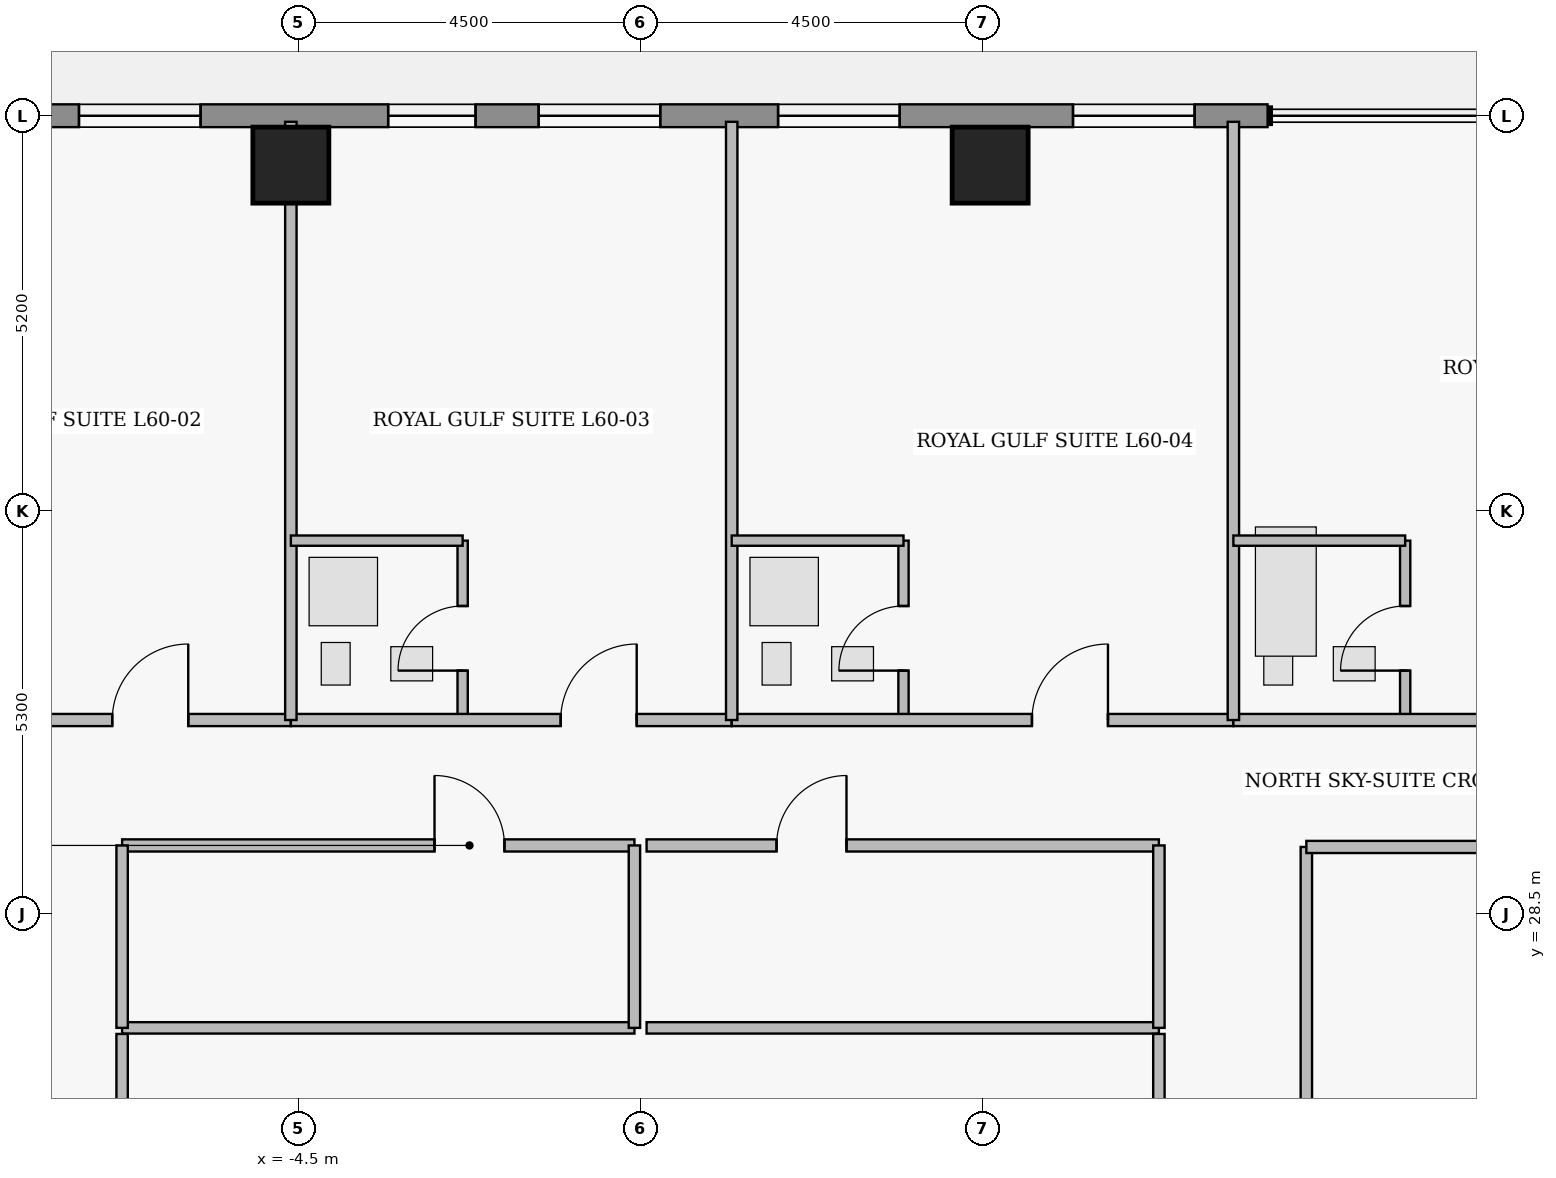
"""IFC4 building model, lengths in metres.
Left out: names, types, materials, properties, quantities, classifications, styles, units other than length and angle.
Written with IfcOpenShell. Run it as: python <this file> out.ifc"""

import sys

from ifc_helpers import new_model, si_unit, direction, frame, frame_2d, origin, origin_2d, place, context, subcontext, project, spatial, rectangle, extrude, element, fill, save


model = new_model("IFC4")
c1 = context("Model", 3, precision=1e-05, world=origin(), true_north=direction((0.0, 1.0)))
c2 = subcontext(c1, "Body", "Model", "MODEL_VIEW")
j1 = project(units=[si_unit("LENGTHUNIT", "METRE"), si_unit("PLANEANGLEUNIT", "RADIAN")], contexts=[c1])
p1 = place(None, origin())
s1 = spatial("IfcSite", under=j1, at=p1, CompositionType="ELEMENT")
p2 = place(p1, origin())
s2 = spatial("IfcBuilding", under=s1, at=p2, CompositionType="ELEMENT")
p3 = place(p2, frame((0.0, 0.0, 239.65)))
s3 = spatial("IfcBuildingStorey", under=s2, at=p3, CompositionType="ELEMENT", Elevation=239.65)
for number, where, z_axis, x_axis in (
    (1, (-4.6, 38.35, 0.43), (0.0, 0.0, 1.0), (1.0, 0.0, 0.0)),
    (2, (4.6, 38.35, 0.43), (0.0, 0.0, 1.0), (1.0, 0.0, 0.0)),
):
    element("IfcColumn", number, at=place(p3, frame(where, z_axis=z_axis, x_axis=x_axis)), inside=s3, PredefinedType="COLUMN", context=c2, shape_type="SweptSolid", body=[
        extrude(rectangle(XDim=1.0, YDim=1.0, at=origin_2d()), origin(), (0.0, 0.0, 1.0), 3.27),
    ])
p4 = place(p3, frame((-16.8, 39.0, 0.0), z_axis=(0.0, 0.0, 1.0), x_axis=(1.0, 0.0, 0.0)))
e3 = element("IfcWall", 3, at=p4, inside=s3, PredefinedType="STANDARD", context=c2, shape_type="SweptSolid", body=[
    extrude(rectangle(XDim=25.05, YDim=0.3, at=frame_2d((12.525, 0.0))), origin(), (0.0, 0.0, 1.0), 3.48),
])
p5 = place(p4, frame((7.325, 0.0, 0.0)))
e4 = element("IfcOpeningElement", 4, at=p5, cuts=e3, PredefinedType="OPENING", context=c2, shape_type="SweptSolid", body=[
    extrude(rectangle(XDim=1.35, YDim=2.3, at=frame_2d((0.675, 1.15))), frame((0.0, 0.16, 0.0), z_axis=(0.0, -1.0, 0.0), x_axis=(1.0, 0.0, 0.0)), (0.0, 0.0, 1.0), 0.32),
])
p6 = place(p4, frame((15.46, 0.0, 0.85)))
e5 = element("IfcOpeningElement", 5, at=p6, cuts=e3, PredefinedType="OPENING", context=c2, shape_type="SweptSolid", body=[
    extrude(rectangle(XDim=1.6, YDim=1.8, at=frame_2d((0.8, 0.9))), frame((0.0, 0.16, 0.0), z_axis=(0.0, -1.0, 0.0), x_axis=(1.0, 0.0, 0.0)), (0.0, 0.0, 1.0), 0.32),
])
p7 = place(p4, frame((0.695, 0.0, 0.95)))
e6 = element("IfcOpeningElement", 6, at=p7, cuts=e3, PredefinedType="OPENING", context=c2, shape_type="SweptSolid", body=[
    extrude(rectangle(XDim=1.15, YDim=1.55, at=frame_2d((0.575, 0.775))), frame((0.0, 0.16, 0.0), z_axis=(0.0, -1.0, 0.0), x_axis=(1.0, 0.0, 0.0)), (0.0, 0.0, 1.0), 0.32),
])
p8 = place(p4, frame((4.09, 0.0, 0.85)))
e7 = element("IfcOpeningElement", 7, at=p8, cuts=e3, PredefinedType="OPENING", context=c2, shape_type="SweptSolid", body=[
    extrude(rectangle(XDim=1.6, YDim=1.8, at=frame_2d((0.8, 0.9))), frame((0.0, 0.16, 0.0), z_axis=(0.0, -1.0, 0.0), x_axis=(1.0, 0.0, 0.0)), (0.0, 0.0, 1.0), 0.32),
])
p9 = place(p4, frame((9.413, 0.0, 0.85)))
e8 = element("IfcOpeningElement", 8, at=p9, cuts=e3, PredefinedType="OPENING", context=c2, shape_type="SweptSolid", body=[
    extrude(rectangle(XDim=1.6, YDim=1.8, at=frame_2d((0.8, 0.9))), frame((0.0, 0.16, 0.0), z_axis=(0.0, -1.0, 0.0), x_axis=(1.0, 0.0, 0.0)), (0.0, 0.0, 1.0), 0.32),
])
p10 = place(p4, frame((13.48, 0.0, 0.95)))
e9 = element("IfcOpeningElement", 9, at=p10, cuts=e3, PredefinedType="OPENING", context=c2, shape_type="SweptSolid", body=[
    extrude(rectangle(XDim=1.15, YDim=1.55, at=frame_2d((0.575, 0.775))), frame((0.0, 0.16, 0.0), z_axis=(0.0, -1.0, 0.0), x_axis=(1.0, 0.0, 0.0)), (0.0, 0.0, 1.0), 0.32),
])
p11 = place(p4, frame((18.61, 0.0, 0.85)))
e10 = element("IfcOpeningElement", 10, at=p11, cuts=e3, PredefinedType="OPENING", context=c2, shape_type="SweptSolid", body=[
    extrude(rectangle(XDim=1.6, YDim=1.8, at=frame_2d((0.8, 0.9))), frame((0.0, 0.16, 0.0), z_axis=(0.0, -1.0, 0.0), x_axis=(1.0, 0.0, 0.0)), (0.0, 0.0, 1.0), 0.32),
])
p12 = place(p4, frame((22.49, 0.0, 0.85)))
e11 = element("IfcOpeningElement", 11, at=p12, cuts=e3, PredefinedType="OPENING", context=c2, shape_type="SweptSolid", body=[
    extrude(rectangle(XDim=1.6, YDim=1.8, at=frame_2d((0.8, 0.9))), frame((0.0, 0.16, 0.0), z_axis=(0.0, -1.0, 0.0), x_axis=(1.0, 0.0, 0.0)), (0.0, 0.0, 1.0), 0.32),
])
p13 = place(p3, frame((-10.6, 31.05, 0.0), z_axis=(0.0, 0.0, 1.0), x_axis=(1.0, 0.0, 0.0)))
e12 = element("IfcWall", 12, at=p13, inside=s3, PredefinedType="PARTITIONING", context=c2, shape_type="SweptSolid", body=[
    extrude(rectangle(XDim=6.0, YDim=0.16, at=frame_2d((3.0, 0.0))), origin(), (0.0, 0.0, 1.0), 3.48),
])
p14 = place(p13, frame((3.65, 0.0, 0.0)))
e13 = element("IfcOpeningElement", 13, at=p14, cuts=e12, PredefinedType="OPENING", context=c2, shape_type="SweptSolid", body=[
    extrude(rectangle(XDim=1.0, YDim=2.15, at=frame_2d((0.5, 1.075))), frame((0.0, 0.09, 0.0), z_axis=(0.0, -1.0, 0.0), x_axis=(1.0, 0.0, 0.0)), (0.0, 0.0, 1.0), 0.18),
])
p15 = place(p3, frame((-2.34, 31.05, 0.0), z_axis=(0.0, 0.0, 1.0), x_axis=(0.0, 1.0, 0.0)))
e14 = element("IfcWall", 14, at=p15, inside=s3, PredefinedType="PLUMBINGWALL", context=c2, shape_type="SweptSolid", body=[
    extrude(rectangle(XDim=2.36, YDim=0.135, at=frame_2d((1.18, 0.0))), origin(), (0.0, 0.0, 1.0), 3.48),
])
p16 = place(p15, frame((0.65, 0.0, 0.0)))
e15 = element("IfcOpeningElement", 15, at=p16, cuts=e14, PredefinedType="OPENING", context=c2, shape_type="SweptSolid", body=[
    extrude(rectangle(XDim=0.85, YDim=2.1, at=frame_2d((0.425, 1.05))), frame((0.0, 0.077, 0.0), z_axis=(0.0, -1.0, 0.0), x_axis=(1.0, 0.0, 0.0)), (0.0, 0.0, 1.0), 0.155),
])
p17 = place(p3, frame((-4.6, 31.05, 0.0), z_axis=(0.0, 0.0, 1.0), x_axis=(1.0, 0.0, 0.0)))
e16 = element("IfcWall", 16, at=p17, inside=s3, PredefinedType="PARTITIONING", context=c2, shape_type="SweptSolid", body=[
    extrude(rectangle(XDim=5.8, YDim=0.16, at=frame_2d((2.9, 0.0))), origin(), (0.0, 0.0, 1.0), 3.48),
])
p18 = place(p17, frame((3.55, 0.0, 0.0)))
e17 = element("IfcOpeningElement", 17, at=p18, cuts=e16, PredefinedType="OPENING", context=c2, shape_type="SweptSolid", body=[
    extrude(rectangle(XDim=1.0, YDim=2.15, at=frame_2d((0.5, 1.075))), frame((0.0, 0.09, 0.0), z_axis=(0.0, -1.0, 0.0), x_axis=(1.0, 0.0, 0.0)), (0.0, 0.0, 1.0), 0.18),
])
p19 = place(p3, frame((3.46, 31.05, 0.0), z_axis=(0.0, 0.0, 1.0), x_axis=(0.0, 1.0, 0.0)))
e18 = element("IfcWall", 18, at=p19, inside=s3, PredefinedType="PLUMBINGWALL", context=c2, shape_type="SweptSolid", body=[
    extrude(rectangle(XDim=2.36, YDim=0.135, at=frame_2d((1.18, 0.0))), origin(), (0.0, 0.0, 1.0), 3.48),
])
p20 = place(p19, frame((0.65, 0.0, 0.0)))
e19 = element("IfcOpeningElement", 19, at=p20, cuts=e18, PredefinedType="OPENING", context=c2, shape_type="SweptSolid", body=[
    extrude(rectangle(XDim=0.85, YDim=2.1, at=frame_2d((0.425, 1.05))), frame((0.0, 0.077, 0.0), z_axis=(0.0, -1.0, 0.0), x_axis=(1.0, 0.0, 0.0)), (0.0, 0.0, 1.0), 0.155),
])
p21 = place(p3, frame((1.2, 31.05, 0.0), z_axis=(0.0, 0.0, 1.0), x_axis=(1.0, 0.0, 0.0)))
e20 = element("IfcWall", 20, at=p21, inside=s3, PredefinedType="PARTITIONING", context=c2, shape_type="SweptSolid", body=[
    extrude(rectangle(XDim=6.6, YDim=0.16, at=frame_2d((3.3, 0.0))), origin(), (0.0, 0.0, 1.0), 3.48),
])
p22 = place(p21, frame((3.95, 0.0, 0.0)))
e21 = element("IfcOpeningElement", 21, at=p22, cuts=e20, PredefinedType="OPENING", context=c2, shape_type="SweptSolid", body=[
    extrude(rectangle(XDim=1.0, YDim=2.15, at=frame_2d((0.5, 1.075))), frame((0.0, 0.09, 0.0), z_axis=(0.0, -1.0, 0.0), x_axis=(1.0, 0.0, 0.0)), (0.0, 0.0, 1.0), 0.18),
])
p23 = place(p3, frame((10.06, 31.05, 0.0), z_axis=(0.0, 0.0, 1.0), x_axis=(0.0, 1.0, 0.0)))
e22 = element("IfcWall", 22, at=p23, inside=s3, PredefinedType="PLUMBINGWALL", context=c2, shape_type="SweptSolid", body=[
    extrude(rectangle(XDim=2.36, YDim=0.135, at=frame_2d((1.18, 0.0))), origin(), (0.0, 0.0, 1.0), 3.48),
])
p24 = place(p23, frame((0.65, 0.0, 0.0)))
e23 = element("IfcOpeningElement", 23, at=p24, cuts=e22, PredefinedType="OPENING", context=c2, shape_type="SweptSolid", body=[
    extrude(rectangle(XDim=0.85, YDim=2.1, at=frame_2d((0.425, 1.05))), frame((0.0, 0.077, 0.0), z_axis=(0.0, -1.0, 0.0), x_axis=(1.0, 0.0, 0.0)), (0.0, 0.0, 1.0), 0.155),
])
p25 = place(p3, frame((7.8, 31.05, 0.0), z_axis=(0.0, 0.0, 1.0), x_axis=(1.0, 0.0, 0.0)))
e24 = element("IfcWall", 24, at=p25, inside=s3, PredefinedType="PARTITIONING", context=c2, shape_type="SweptSolid", body=[
    extrude(rectangle(XDim=12.34, YDim=0.16, at=frame_2d((6.17, 0.0))), origin(), (0.0, 0.0, 1.0), 3.48),
])
p26 = place(p25, frame((6.82, 0.0, 0.0)))
e25 = element("IfcOpeningElement", 25, at=p26, cuts=e24, PredefinedType="OPENING", context=c2, shape_type="SweptSolid", body=[
    extrude(rectangle(XDim=1.0, YDim=2.15, at=frame_2d((0.5, 1.075))), frame((0.0, 0.09, 0.0), z_axis=(0.0, -1.0, 0.0), x_axis=(1.0, 0.0, 0.0)), (0.0, 0.0, 1.0), 0.18),
])
p27 = place(p3, frame((-6.82, 29.4, 0.0), z_axis=(0.0, 0.0, 1.0), x_axis=(1.0, 0.0, 0.0)))
e26 = element("IfcWall", 26, at=p27, inside=s3, PredefinedType="PARTITIONING", context=c2, shape_type="SweptSolid", body=[
    extrude(rectangle(XDim=6.74, YDim=0.16, at=frame_2d((3.37, 0.0))), origin(), (0.0, 0.0, 1.0), 3.48),
])
p28 = place(p27, frame((4.11, 0.0, 0.0)))
e27 = element("IfcOpeningElement", 27, at=p28, cuts=e26, PredefinedType="OPENING", context=c2, shape_type="SweptSolid", body=[
    extrude(rectangle(XDim=0.92, YDim=2.12, at=frame_2d((0.46, 1.06))), frame((0.0, 0.09, 0.0), z_axis=(0.0, -1.0, 0.0), x_axis=(1.0, 0.0, 0.0)), (0.0, 0.0, 1.0), 0.18),
])
p29 = place(p3, frame((0.08, 29.4, 0.0), z_axis=(0.0, 0.0, 1.0), x_axis=(1.0, 0.0, 0.0)))
e28 = element("IfcWall", 28, at=p29, inside=s3, PredefinedType="PARTITIONING", context=c2, shape_type="SweptSolid", body=[
    extrude(rectangle(XDim=6.74, YDim=0.16, at=frame_2d((3.37, 0.0))), origin(), (0.0, 0.0, 1.0), 3.48),
])
p30 = place(p29, frame((1.71, 0.0, 0.0)))
e29 = element("IfcOpeningElement", 29, at=p30, cuts=e28, PredefinedType="OPENING", context=c2, shape_type="SweptSolid", body=[
    extrude(rectangle(XDim=0.92, YDim=2.12, at=frame_2d((0.46, 1.06))), frame((0.0, 0.09, 0.0), z_axis=(0.0, -1.0, 0.0), x_axis=(1.0, 0.0, 0.0)), (0.0, 0.0, 1.0), 0.18),
])
p31 = place(p3, frame((-4.6, 31.05, 0.0), z_axis=(0.0, 0.0, 1.0), x_axis=(0.0, 1.0, 0.0)))
e30 = element("IfcWall", 30, at=p31, inside=s3, PredefinedType="PARTITIONING", context=c2, shape_type="SweptSolid", body=[
    extrude(rectangle(XDim=7.87, YDim=0.15, at=frame_2d((3.935, 0.0))), origin(), (0.0, 0.0, 1.0), 2.362),
])
p32 = place(p3, frame((-4.6, 33.41, 0.0), z_axis=(0.0, 0.0, 1.0), x_axis=(1.0, 0.0, 0.0)))
e31 = element("IfcWall", 31, at=p32, inside=s3, PredefinedType="PLUMBINGWALL", context=c2, shape_type="SweptSolid", body=[
    extrude(rectangle(XDim=2.26, YDim=0.135, at=frame_2d((1.13, 0.0))), origin(), (0.0, 0.0, 1.0), 3.076),
])
p33 = place(p3, frame((1.2, 31.05, 0.0), z_axis=(0.0, 0.0, 1.0), x_axis=(0.0, 1.0, 0.0)))
e32 = element("IfcWall", 32, at=p33, inside=s3, PredefinedType="PARTITIONING", context=c2, shape_type="SweptSolid", body=[
    extrude(rectangle(XDim=7.87, YDim=0.15, at=frame_2d((3.935, 0.0))), origin(), (0.0, 0.0, 1.0), 3.48),
])
p34 = place(p3, frame((1.2, 33.41, 0.0), z_axis=(0.0, 0.0, 1.0), x_axis=(1.0, 0.0, 0.0)))
e33 = element("IfcWall", 33, at=p34, inside=s3, PredefinedType="PLUMBINGWALL", context=c2, shape_type="SweptSolid", body=[
    extrude(rectangle(XDim=2.26, YDim=0.135, at=frame_2d((1.13, 0.0))), origin(), (0.0, 0.0, 1.0), 3.076),
])
p35 = place(p3, frame((7.8, 31.05, 0.0), z_axis=(0.0, 0.0, 1.0), x_axis=(0.0, 1.0, 0.0)))
e34 = element("IfcWall", 34, at=p35, inside=s3, PredefinedType="PARTITIONING", context=c2, shape_type="SweptSolid", body=[
    extrude(rectangle(XDim=7.87, YDim=0.15, at=frame_2d((3.935, 0.0))), origin(), (0.0, 0.0, 1.0), 3.48),
])
p36 = place(p3, frame((7.8, 33.41, 0.0), z_axis=(0.0, 0.0, 1.0), x_axis=(1.0, 0.0, 0.0)))
e35 = element("IfcWall", 35, at=p36, inside=s3, PredefinedType="PLUMBINGWALL", context=c2, shape_type="SweptSolid", body=[
    extrude(rectangle(XDim=2.26, YDim=0.135, at=frame_2d((1.13, 0.0))), origin(), (0.0, 0.0, 1.0), 3.076),
])
p37 = place(p3, frame((-6.82, 27.0, 0.0), z_axis=(0.0, 0.0, 1.0), x_axis=(1.0, 0.0, 0.0)))
e36 = element("IfcWall", 36, at=p37, inside=s3, PredefinedType="PARTITIONING", context=c2, shape_type="SweptSolid", body=[
    extrude(rectangle(XDim=6.74, YDim=0.15, at=frame_2d((3.37, 0.0))), origin(), (0.0, 0.0, 1.0), 3.48),
])
for number, where, z_axis, x_axis in (
    (37, (-6.82, 27.0, 0.0), (0.0, 0.0, 1.0), (0.0, 1.0, 0.0)),
    (38, (-0.08, 27.0, 0.0), (0.0, 0.0, 1.0), (0.0, 1.0, 0.0)),
):
    element("IfcWall", number, at=place(p3, frame(where, z_axis=z_axis, x_axis=x_axis)), inside=s3, PredefinedType="PARTITIONING", context=c2, shape_type="SweptSolid", body=[
        extrude(rectangle(XDim=2.4, YDim=0.15, at=frame_2d((1.2, 0.0))), origin(), (0.0, 0.0, 1.0), 3.48),
    ])
p38 = place(p3, frame((0.08, 27.0, 0.0), z_axis=(0.0, 0.0, 1.0), x_axis=(1.0, 0.0, 0.0)))
e39 = element("IfcWall", 39, at=p38, inside=s3, PredefinedType="PARTITIONING", context=c2, shape_type="SweptSolid", body=[
    extrude(rectangle(XDim=6.74, YDim=0.15, at=frame_2d((3.37, 0.0))), origin(), (0.0, 0.0, 1.0), 3.48),
])
p39 = place(p3, frame((6.82, 27.0, 0.0), z_axis=(0.0, 0.0, 1.0), x_axis=(0.0, 1.0, 0.0)))
e40 = element("IfcWall", 40, at=p39, inside=s3, PredefinedType="PARTITIONING", context=c2, shape_type="SweptSolid", body=[
    extrude(rectangle(XDim=2.4, YDim=0.15, at=frame_2d((1.2, 0.0))), origin(), (0.0, 0.0, 1.0), 3.48),
])
for number, where, z_axis, x_axis in (
    (41, (-6.82, 16.7, 0.0), (0.0, 0.0, 1.0), (0.0, 1.0, 0.0)),
    (42, (6.82, 16.7, 0.0), (0.0, 0.0, 1.0), (0.0, 1.0, 0.0)),
):
    element("IfcWall", number, at=place(p3, frame(where, z_axis=z_axis, x_axis=x_axis)), inside=s3, PredefinedType="PARTITIONING", context=c2, shape_type="SweptSolid", body=[
        extrude(rectangle(XDim=10.22, YDim=0.15, at=frame_2d((5.11, 0.0))), origin(), (0.0, 0.0, 1.0), 3.48),
    ])
p40 = place(p3, frame((8.76, 16.7, 0.0), z_axis=(0.0, 0.0, 1.0), x_axis=(0.0, 1.0, 0.0)))
e43 = element("IfcWall", 43, at=p40, inside=s3, PredefinedType="PARTITIONING", context=c2, shape_type="SweptSolid", body=[
    extrude(rectangle(XDim=12.68, YDim=0.15, at=frame_2d((6.34, 0.0))), origin(), (0.0, 0.0, 1.0), 3.48),
])
p41 = place(p3, frame((8.76, 29.38, 0.0), z_axis=(0.0, 0.0, 1.0), x_axis=(1.0, 0.0, 0.0)))
e44 = element("IfcWall", 44, at=p41, inside=s3, PredefinedType="PARTITIONING", context=c2, shape_type="SweptSolid", body=[
    extrude(rectangle(XDim=13.88, YDim=0.16, at=frame_2d((6.94, 0.0))), origin(), (0.0, 0.0, 1.0), 3.48),
])
p42 = place(p6, origin())
e45 = element("IfcWindow", 45, at=p42, inside=s3, PartitioningType="SINGLE_PANEL", PredefinedType="WINDOW", context=c2, shape_type="SweptSolid", body=[
    extrude(rectangle(XDim=1.6, YDim=1.8, at=frame_2d((0.8, 0.9))), frame((0.0, 0.03, 0.0), z_axis=(0.0, -1.0, 0.0), x_axis=(1.0, 0.0, 0.0)), (0.0, 0.0, 1.0), 0.06),
])
fill(e5, e45)
p43 = place(p9, origin())
e46 = element("IfcWindow", 46, at=p43, inside=s3, PartitioningType="SINGLE_PANEL", PredefinedType="WINDOW", context=c2, shape_type="SweptSolid", body=[
    extrude(rectangle(XDim=1.6, YDim=1.8, at=frame_2d((0.8, 0.9))), frame((0.0, 0.03, 0.0), z_axis=(0.0, -1.0, 0.0), x_axis=(1.0, 0.0, 0.0)), (0.0, 0.0, 1.0), 0.06),
])
fill(e8, e46)
p44 = place(p10, origin())
e47 = element("IfcWindow", 47, at=p44, inside=s3, PartitioningType="SINGLE_PANEL", PredefinedType="WINDOW", context=c2, shape_type="SweptSolid", body=[
    extrude(rectangle(XDim=1.15, YDim=1.55, at=frame_2d((0.575, 0.775))), frame((0.0, 0.03, 0.0), z_axis=(0.0, -1.0, 0.0), x_axis=(1.0, 0.0, 0.0)), (0.0, 0.0, 1.0), 0.06),
])
fill(e9, e47)
p45 = place(p11, origin())
e48 = element("IfcWindow", 48, at=p45, inside=s3, PartitioningType="SINGLE_PANEL", PredefinedType="WINDOW", context=c2, shape_type="SweptSolid", body=[
    extrude(rectangle(XDim=1.6, YDim=1.8, at=frame_2d((0.8, 0.9))), frame((0.0, 0.03, 0.0), z_axis=(0.0, -1.0, 0.0), x_axis=(1.0, 0.0, 0.0)), (0.0, 0.0, 1.0), 0.06),
])
fill(e10, e48)
p46 = place(p12, origin())
e49 = element("IfcWindow", 49, at=p46, inside=s3, PartitioningType="SINGLE_PANEL", PredefinedType="WINDOW", context=c2, shape_type="SweptSolid", body=[
    extrude(rectangle(XDim=1.6, YDim=1.8, at=frame_2d((0.8, 0.9))), frame((0.0, 0.03, 0.0), z_axis=(0.0, -1.0, 0.0), x_axis=(1.0, 0.0, 0.0)), (0.0, 0.0, 1.0), 0.06),
])
fill(e11, e49)
p47 = place(p14, origin())
e50 = element("IfcDoor", 50, at=p47, inside=s3, OperationType="SINGLE_SWING_RIGHT", PredefinedType="DOOR", context=c2, shape_type="SweptSolid", body=[
    extrude(rectangle(XDim=1.0, YDim=2.15, at=frame_2d((0.5, 1.075))), frame((0.0, 0.025, 0.0), z_axis=(0.0, -1.0, 0.0), x_axis=(1.0, 0.0, 0.0)), (0.0, 0.0, 1.0), 0.05),
])
fill(e13, e50)
p48 = place(p16, origin())
e51 = element("IfcDoor", 51, at=p48, inside=s3, OperationType="SINGLE_SWING_LEFT", PredefinedType="DOOR", context=c2, shape_type="SweptSolid", body=[
    extrude(rectangle(XDim=0.85, YDim=2.1, at=frame_2d((0.425, 1.05))), frame((0.0, 0.025, 0.0), z_axis=(0.0, -1.0, 0.0), x_axis=(1.0, 0.0, 0.0)), (0.0, 0.0, 1.0), 0.05),
])
fill(e15, e51)
p49 = place(p18, origin())
e52 = element("IfcDoor", 52, at=p49, inside=s3, OperationType="SINGLE_SWING_RIGHT", PredefinedType="DOOR", context=c2, shape_type="SweptSolid", body=[
    extrude(rectangle(XDim=1.0, YDim=2.15, at=frame_2d((0.5, 1.075))), frame((0.0, 0.025, 0.0), z_axis=(0.0, -1.0, 0.0), x_axis=(1.0, 0.0, 0.0)), (0.0, 0.0, 1.0), 0.05),
])
fill(e17, e52)
p50 = place(p20, origin())
e53 = element("IfcDoor", 53, at=p50, inside=s3, OperationType="SINGLE_SWING_LEFT", PredefinedType="DOOR", context=c2, shape_type="SweptSolid", body=[
    extrude(rectangle(XDim=0.85, YDim=2.1, at=frame_2d((0.425, 1.05))), frame((0.0, 0.025, 0.0), z_axis=(0.0, -1.0, 0.0), x_axis=(1.0, 0.0, 0.0)), (0.0, 0.0, 1.0), 0.05),
])
fill(e19, e53)
p51 = place(p22, origin())
e54 = element("IfcDoor", 54, at=p51, inside=s3, OperationType="SINGLE_SWING_RIGHT", PredefinedType="DOOR", context=c2, shape_type="SweptSolid", body=[
    extrude(rectangle(XDim=1.0, YDim=2.15, at=frame_2d((0.5, 1.075))), frame((0.0, 0.025, 0.0), z_axis=(0.0, -1.0, 0.0), x_axis=(1.0, 0.0, 0.0)), (0.0, 0.0, 1.0), 0.05),
])
fill(e21, e54)
p52 = place(p24, origin())
e55 = element("IfcDoor", 55, at=p52, inside=s3, OperationType="SINGLE_SWING_LEFT", PredefinedType="DOOR", context=c2, shape_type="SweptSolid", body=[
    extrude(rectangle(XDim=0.85, YDim=2.1, at=frame_2d((0.425, 1.05))), frame((0.0, 0.025, 0.0), z_axis=(0.0, -1.0, 0.0), x_axis=(1.0, 0.0, 0.0)), (0.0, 0.0, 1.0), 0.05),
])
fill(e23, e55)
p53 = place(p28, origin())
e56 = element("IfcDoor", 56, at=p53, inside=s3, OperationType="SINGLE_SWING_LEFT", PredefinedType="DOOR", context=c2, shape_type="SweptSolid", body=[
    extrude(rectangle(XDim=0.92, YDim=2.12, at=frame_2d((0.46, 1.06))), frame((0.0, 0.025, 0.0), z_axis=(0.0, -1.0, 0.0), x_axis=(1.0, 0.0, 0.0)), (0.0, 0.0, 1.0), 0.05),
])
fill(e27, e56)
p54 = place(p30, origin())
e57 = element("IfcDoor", 57, at=p54, inside=s3, OperationType="SINGLE_SWING_RIGHT", PredefinedType="DOOR", context=c2, shape_type="SweptSolid", body=[
    extrude(rectangle(XDim=0.92, YDim=2.12, at=frame_2d((0.46, 1.06))), frame((0.0, 0.025, 0.0), z_axis=(0.0, -1.0, 0.0), x_axis=(1.0, 0.0, 0.0)), (0.0, 0.0, 1.0), 0.05),
])
fill(e29, e57)
save(model, sys.argv[1])
